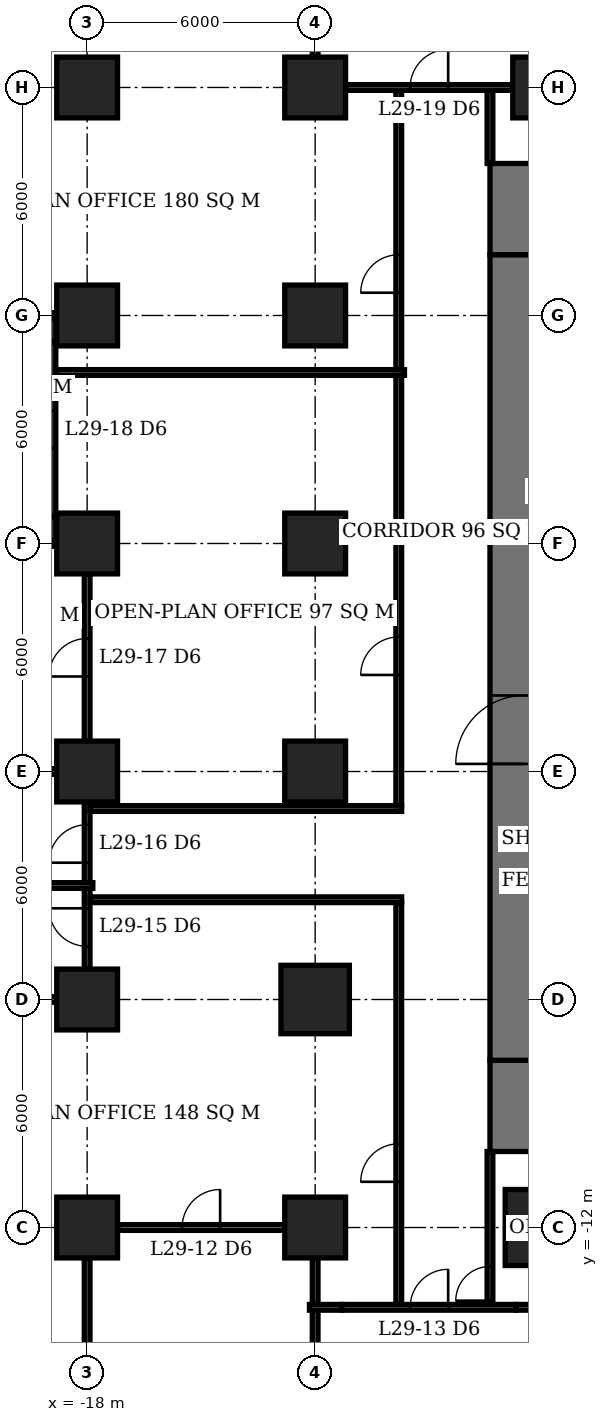
"""IFC4 building model, lengths in metres.
Left out: names, types, materials, properties, quantities, classifications, styles, units other than length and angle.
Written with IfcOpenShell. Run it as: python <this file> out.ifc"""

import sys

from ifc_helpers import new_model, si_unit, direction, frame, frame_2d, origin, origin_2d, place, context, subcontext, project, spatial, rectangle, extrude, element, fill, save


model = new_model("IFC4")
c1 = context("Model", 3, precision=1e-05, world=origin(), true_north=direction((0.0, 1.0)))
c2 = subcontext(c1, "Body", "Model", "MODEL_VIEW")
j1 = project(units=[si_unit("LENGTHUNIT", "METRE"), si_unit("PLANEANGLEUNIT", "RADIAN")], contexts=[c1])
p1 = place(None, origin())
s1 = spatial("IfcSite", under=j1, at=p1, CompositionType="ELEMENT")
p2 = place(p1, origin())
s2 = spatial("IfcBuilding", under=s1, at=p2, CompositionType="ELEMENT")
p3 = place(p2, frame((0.0, 0.0, 121.1)))
s3 = spatial("IfcBuildingStorey", under=s2, at=p3, CompositionType="ELEMENT", Elevation=121.1)
for number, where, z_axis, x_axis in (
    (1, (-18.0, -12.0, 0.0), (0.0, 0.0, 1.0), (1.0, 0.0, 0.0)),
    (2, (-18.0, -6.0, 0.0), (0.0, 0.0, 1.0), (1.0, 0.0, 0.0)),
    (3, (-18.0, 0.0, 0.0), (0.0, 0.0, 1.0), (1.0, 0.0, 0.0)),
    (4, (-18.0, 6.0, 0.0), (0.0, 0.0, 1.0), (1.0, 0.0, 0.0)),
    (5, (-18.0, 12.0, 0.0), (0.0, 0.0, 1.0), (1.0, 0.0, 0.0)),
    (6, (-18.0, 18.0, 0.0), (0.0, 0.0, 1.0), (1.0, 0.0, 0.0)),
    (7, (-12.0, -12.0, 0.0), (0.0, 0.0, 1.0), (1.0, 0.0, 0.0)),
):
    element("IfcColumn", number, at=place(p3, frame(where, z_axis=z_axis, x_axis=x_axis)), inside=s3, PredefinedType="COLUMN", context=c2, shape_type="SweptSolid", body=[
        extrude(rectangle(XDim=1.6, YDim=1.6, at=origin_2d()), origin(), (0.0, 0.0, 1.0), 3.9),
    ])
p4 = place(p3, frame((-12.0, -6.0, 0.0), z_axis=(0.0, 0.0, 1.0), x_axis=(1.0, 0.0, 0.0)))
e8 = element("IfcColumn", 8, at=p4, inside=s3, PredefinedType="COLUMN", context=c2, shape_type="SweptSolid", body=[
    extrude(rectangle(XDim=1.8, YDim=1.8, at=origin_2d()), origin(), (0.0, 0.0, 1.0), 3.9),
])
for number, where, z_axis, x_axis in (
    (9, (-12.0, 0.0, 0.0), (0.0, 0.0, 1.0), (1.0, 0.0, 0.0)),
    (10, (-12.0, 6.0, 0.0), (0.0, 0.0, 1.0), (1.0, 0.0, 0.0)),
    (11, (-12.0, 12.0, 0.0), (0.0, 0.0, 1.0), (1.0, 0.0, 0.0)),
    (12, (-12.0, 18.0, 0.0), (0.0, 0.0, 1.0), (1.0, 0.0, 0.0)),
):
    element("IfcColumn", number, at=place(p3, frame(where, z_axis=z_axis, x_axis=x_axis)), inside=s3, PredefinedType="COLUMN", context=c2, shape_type="SweptSolid", body=[
        extrude(rectangle(XDim=1.6, YDim=1.6, at=origin_2d()), origin(), (0.0, 0.0, 1.0), 3.9),
    ])
p5 = place(p3, frame((-6.0, -12.0, 0.0), z_axis=(0.0, 0.0, 1.0), x_axis=(1.0, 0.0, 0.0)))
e13 = element("IfcColumn", 13, at=p5, inside=s3, PredefinedType="COLUMN", context=c2, shape_type="SweptSolid", body=[
    extrude(rectangle(XDim=2.0, YDim=2.0, at=origin_2d()), origin(), (0.0, 0.0, 1.0), 3.9),
])
p6 = place(p3, frame((-6.0, 18.0, 0.0), z_axis=(0.0, 0.0, 1.0), x_axis=(1.0, 0.0, 0.0)))
e14 = element("IfcColumn", 14, at=p6, inside=s3, PredefinedType="COLUMN", context=c2, shape_type="SweptSolid", body=[
    extrude(rectangle(XDim=1.6, YDim=1.6, at=origin_2d()), origin(), (0.0, 0.0, 1.0), 3.9),
])
p7 = place(p3, frame((-6.5, -7.6, 0.0), z_axis=(0.0, 0.0, 1.0), x_axis=(0.0, 1.0, 0.0)))
e15 = element("IfcWall", 15, at=p7, inside=s3, PredefinedType="SHEAR", context=c2, shape_type="SweptSolid", body=[
    extrude(rectangle(XDim=21.2, YDim=1.8, at=frame_2d((10.6, 0.0))), origin(), (0.0, 0.0, 1.0), 3.9),
])
p8 = place(p7, frame((7.8, 0.0, 0.0)))
e16 = element("IfcOpeningElement", 16, at=p8, cuts=e15, PredefinedType="OPENING", context=c2, shape_type="SweptSolid", body=[
    extrude(rectangle(XDim=1.8, YDim=2.4, at=frame_2d((0.9, 1.2))), frame((0.0, 0.91, 0.0), z_axis=(0.0, -1.0, 0.0), x_axis=(1.0, 0.0, 0.0)), (0.0, 0.0, 1.0), 1.82),
])
for number, where, z_axis, x_axis in (
    (17, (-6.5, -10.0, 0.0), (0.0, 0.0, 1.0), (0.0, 1.0, 0.0)),
    (18, (-6.5, 13.6, 0.0), (0.0, 0.0, 1.0), (0.0, 1.0, 0.0)),
):
    element("IfcWall", number, at=place(p3, frame(where, z_axis=z_axis, x_axis=x_axis)), inside=s3, PredefinedType="SHEAR", context=c2, shape_type="SweptSolid", body=[
        extrude(rectangle(XDim=2.4, YDim=1.8, at=frame_2d((1.2, 0.0))), origin(), (0.0, 0.0, 1.0), 3.9),
    ])
p9 = place(p3, frame((-12.15, -14.1, 0.0), z_axis=(0.0, 0.0, 1.0), x_axis=(1.0, 0.0, 0.0)))
e19 = element("IfcWall", 19, at=p9, inside=s3, PredefinedType="PARTITIONING", context=c2, shape_type="SweptSolid", body=[
    extrude(rectangle(XDim=0.86, YDim=0.15, at=frame_2d((0.43, 0.0))), origin(), (0.0, 0.0, 1.0), 2.65),
])
p10 = place(p3, frame((-11.29, -14.1, 0.0), z_axis=(0.0, 0.0, 1.0), x_axis=(1.0, 0.0, 0.0)))
e20 = element("IfcWall", 20, at=p10, inside=s3, PredefinedType="PARTITIONING", context=c2, shape_type="SweptSolid", body=[
    extrude(rectangle(XDim=4.58, YDim=0.15, at=frame_2d((2.29, 0.0))), origin(), (0.0, 0.0, 1.0), 3.65),
])
p11 = place(p10, frame((1.79, 0.0, 0.0)))
e21 = element("IfcOpeningElement", 21, at=p11, cuts=e20, PredefinedType="OPENING", context=c2, shape_type="SweptSolid", body=[
    extrude(rectangle(XDim=1.0, YDim=2.1, at=frame_2d((0.5, 1.05))), frame((0.0, 0.085, 0.0), z_axis=(0.0, -1.0, 0.0), x_axis=(1.0, 0.0, 0.0)), (0.0, 0.0, 1.0), 0.17),
])
p12 = place(p3, frame((-6.71, -14.1, 0.0), z_axis=(0.0, 0.0, 1.0), x_axis=(1.0, 0.0, 0.0)))
e22 = element("IfcWall", 22, at=p12, inside=s3, PredefinedType="PARTITIONING", context=c2, shape_type="SweptSolid", body=[
    extrude(rectangle(XDim=0.785, YDim=0.15, at=frame_2d((0.393, 0.0))), origin(), (0.0, 0.0, 1.0), 2.65),
])
p13 = place(p3, frame((-17.2, -12.0, 0.0), z_axis=(0.0, 0.0, 1.0), x_axis=(1.0, 0.0, 0.0)))
e23 = element("IfcWall", 23, at=p13, inside=s3, PredefinedType="PARTITIONING", context=c2, shape_type="SweptSolid", body=[
    extrude(rectangle(XDim=4.4, YDim=0.15, at=frame_2d((2.2, 0.0))), origin(), (0.0, 0.0, 1.0), 3.65),
])
p14 = place(p13, frame((1.7, 0.0, 0.0)))
e24 = element("IfcOpeningElement", 24, at=p14, cuts=e23, PredefinedType="OPENING", context=c2, shape_type="SweptSolid", body=[
    extrude(rectangle(XDim=1.0, YDim=2.1, at=frame_2d((0.5, 1.05))), frame((0.0, 0.085, 0.0), z_axis=(0.0, -1.0, 0.0), x_axis=(1.0, 0.0, 0.0)), (0.0, 0.0, 1.0), 0.17),
])
p15 = place(p3, frame((-22.31, -6.0, 0.0), z_axis=(0.0, 0.0, 1.0), x_axis=(1.0, 0.0, 0.0)))
e25 = element("IfcWall", 25, at=p15, inside=s3, PredefinedType="PARTITIONING", context=c2, shape_type="SweptSolid", body=[
    extrude(rectangle(XDim=3.51, YDim=0.15, at=frame_2d((1.755, 0.0))), origin(), (0.0, 0.0, 1.0), 2.65),
])
p16 = place(p3, frame((-21.59, -3.0, 0.0), z_axis=(0.0, 0.0, 1.0), x_axis=(1.0, 0.0, 0.0)))
e26 = element("IfcWall", 26, at=p16, inside=s3, PredefinedType="PARTITIONING", context=c2, shape_type="SweptSolid", body=[
    extrude(rectangle(XDim=3.74, YDim=0.15, at=frame_2d((1.87, 0.0))), origin(), (0.0, 0.0, 1.0), 3.65),
])
p17 = place(p3, frame((-22.31, 0.0, 0.0), z_axis=(0.0, 0.0, 1.0), x_axis=(1.0, 0.0, 0.0)))
e27 = element("IfcWall", 27, at=p17, inside=s3, PredefinedType="PARTITIONING", context=c2, shape_type="SweptSolid", body=[
    extrude(rectangle(XDim=3.51, YDim=0.15, at=frame_2d((1.755, 0.0))), origin(), (0.0, 0.0, 1.0), 2.65),
])
for number, where, z_axis, x_axis in (
    (28, (-22.31, 6.0, 0.0), (0.0, 0.0, 1.0), (1.0, 0.0, 0.0)),
    (29, (-22.31, 12.0, 0.0), (0.0, 0.0, 1.0), (1.0, 0.0, 0.0)),
):
    element("IfcWall", number, at=place(p3, frame(where, z_axis=z_axis, x_axis=x_axis)), inside=s3, PredefinedType="PARTITIONING", context=c2, shape_type="SweptSolid", body=[
        extrude(rectangle(XDim=3.485, YDim=0.15, at=frame_2d((1.743, 0.0))), origin(), (0.0, 0.0, 1.0), 2.65),
    ])
p18 = place(p3, frame((-11.2, 18.0, 0.0), z_axis=(0.0, 0.0, 1.0), x_axis=(1.0, 0.0, 0.0)))
e30 = element("IfcWall", 30, at=p18, inside=s3, PredefinedType="PARTITIONING", context=c2, shape_type="SweptSolid", body=[
    extrude(rectangle(XDim=4.4, YDim=0.15, at=frame_2d((2.2, 0.0))), origin(), (0.0, 0.0, 1.0), 3.65),
])
p19 = place(p18, frame((1.7, 0.0, 0.0)))
e31 = element("IfcOpeningElement", 31, at=p19, cuts=e30, PredefinedType="OPENING", context=c2, shape_type="SweptSolid", body=[
    extrude(rectangle(XDim=1.0, YDim=2.1, at=frame_2d((0.5, 1.05))), frame((0.0, 0.085, 0.0), z_axis=(0.0, -1.0, 0.0), x_axis=(1.0, 0.0, 0.0)), (0.0, 0.0, 1.0), 0.17),
])
p20 = place(p3, frame((-18.9, 6.075, 0.0), z_axis=(0.0, 0.0, 1.0), x_axis=(0.0, 1.0, 0.0)))
e32 = element("IfcWall", 32, at=p20, inside=s3, PredefinedType="PARTITIONING", context=c2, shape_type="SweptSolid", body=[
    extrude(rectangle(XDim=0.635, YDim=0.15, at=frame_2d((0.317, 0.0))), origin(), (0.0, 0.0, 1.0), 2.65),
])
p21 = place(p3, frame((-18.9, 6.71, 0.0), z_axis=(0.0, 0.0, 1.0), x_axis=(0.0, 1.0, 0.0)))
e33 = element("IfcWall", 33, at=p21, inside=s3, PredefinedType="PARTITIONING", context=c2, shape_type="SweptSolid", body=[
    extrude(rectangle(XDim=4.58, YDim=0.15, at=frame_2d((2.29, 0.0))), origin(), (0.0, 0.0, 1.0), 3.65),
])
p22 = place(p21, frame((1.79, 0.0, 0.0)))
e34 = element("IfcOpeningElement", 34, at=p22, cuts=e33, PredefinedType="OPENING", context=c2, shape_type="SweptSolid", body=[
    extrude(rectangle(XDim=1.0, YDim=2.1, at=frame_2d((0.5, 1.05))), frame((0.0, 0.085, 0.0), z_axis=(0.0, -1.0, 0.0), x_axis=(1.0, 0.0, 0.0)), (0.0, 0.0, 1.0), 0.17),
])
p23 = place(p3, frame((-18.9, 11.29, 0.0), z_axis=(0.0, 0.0, 1.0), x_axis=(0.0, 1.0, 0.0)))
e35 = element("IfcWall", 35, at=p23, inside=s3, PredefinedType="PARTITIONING", context=c2, shape_type="SweptSolid", body=[
    extrude(rectangle(XDim=0.635, YDim=0.15, at=frame_2d((0.317, 0.0))), origin(), (0.0, 0.0, 1.0), 2.65),
])
p24 = place(p3, frame((-18.0, -16.31, 0.0), z_axis=(0.0, 0.0, 1.0), x_axis=(0.0, 1.0, 0.0)))
e36 = element("IfcWall", 36, at=p24, inside=s3, PredefinedType="PARTITIONING", context=c2, shape_type="SweptSolid", body=[
    extrude(rectangle(XDim=3.51, YDim=0.15, at=frame_2d((1.755, 0.0))), origin(), (0.0, 0.0, 1.0), 2.65),
])
p25 = place(p3, frame((-18.0, -5.2, 0.0), z_axis=(0.0, 0.0, 1.0), x_axis=(0.0, 1.0, 0.0)))
e37 = element("IfcWall", 37, at=p25, inside=s3, PredefinedType="PARTITIONING", context=c2, shape_type="SweptSolid", body=[
    extrude(rectangle(XDim=2.125, YDim=0.15, at=frame_2d((1.062, 0.0))), origin(), (0.0, 0.0, 1.0), 3.65),
])
p26 = place(p25, frame((0.6, 0.0, 0.0)))
e38 = element("IfcOpeningElement", 38, at=p26, cuts=e37, PredefinedType="OPENING", context=c2, shape_type="SweptSolid", body=[
    extrude(rectangle(XDim=1.0, YDim=2.1, at=frame_2d((0.5, 1.05))), frame((0.0, 0.085, 0.0), z_axis=(0.0, -1.0, 0.0), x_axis=(1.0, 0.0, 0.0)), (0.0, 0.0, 1.0), 0.17),
])
p27 = place(p3, frame((-18.0, -2.925, 0.0), z_axis=(0.0, 0.0, 1.0), x_axis=(0.0, 1.0, 0.0)))
e39 = element("IfcWall", 39, at=p27, inside=s3, PredefinedType="PARTITIONING", context=c2, shape_type="SweptSolid", body=[
    extrude(rectangle(XDim=2.125, YDim=0.15, at=frame_2d((1.062, 0.0))), origin(), (0.0, 0.0, 1.0), 3.65),
])
p28 = place(p27, frame((0.525, 0.0, 0.0)))
e40 = element("IfcOpeningElement", 40, at=p28, cuts=e39, PredefinedType="OPENING", context=c2, shape_type="SweptSolid", body=[
    extrude(rectangle(XDim=1.0, YDim=2.1, at=frame_2d((0.5, 1.05))), frame((0.0, 0.085, 0.0), z_axis=(0.0, -1.0, 0.0), x_axis=(1.0, 0.0, 0.0)), (0.0, 0.0, 1.0), 0.17),
])
p29 = place(p3, frame((-18.0, 0.8, 0.0), z_axis=(0.0, 0.0, 1.0), x_axis=(0.0, 1.0, 0.0)))
e41 = element("IfcWall", 41, at=p29, inside=s3, PredefinedType="PARTITIONING", context=c2, shape_type="SweptSolid", body=[
    extrude(rectangle(XDim=4.4, YDim=0.15, at=frame_2d((2.2, 0.0))), origin(), (0.0, 0.0, 1.0), 3.65),
])
p30 = place(p29, frame((1.7, 0.0, 0.0)))
e42 = element("IfcOpeningElement", 42, at=p30, cuts=e41, PredefinedType="OPENING", context=c2, shape_type="SweptSolid", body=[
    extrude(rectangle(XDim=1.0, YDim=2.1, at=frame_2d((0.5, 1.05))), frame((0.0, 0.085, 0.0), z_axis=(0.0, -1.0, 0.0), x_axis=(1.0, 0.0, 0.0)), (0.0, 0.0, 1.0), 0.17),
])
p31 = place(p3, frame((-12.0, -16.31, 0.0), z_axis=(0.0, 0.0, 1.0), x_axis=(0.0, 1.0, 0.0)))
e43 = element("IfcWall", 43, at=p31, inside=s3, PredefinedType="PARTITIONING", context=c2, shape_type="SweptSolid", body=[
    extrude(rectangle(XDim=2.135, YDim=0.15, at=frame_2d((1.067, 0.0))), origin(), (0.0, 0.0, 1.0), 2.65),
])
p32 = place(p3, frame((-12.0, -14.025, 0.0), z_axis=(0.0, 0.0, 1.0), x_axis=(0.0, 1.0, 0.0)))
e44 = element("IfcWall", 44, at=p32, inside=s3, PredefinedType="PARTITIONING", context=c2, shape_type="SweptSolid", body=[
    extrude(rectangle(XDim=1.225, YDim=0.15, at=frame_2d((0.612, 0.0))), origin(), (0.0, 0.0, 1.0), 2.65),
])
p33 = place(p3, frame((-12.0, 18.8, 0.0), z_axis=(0.0, 0.0, 1.0), x_axis=(0.0, 1.0, 0.0)))
e45 = element("IfcWall", 45, at=p33, inside=s3, PredefinedType="PARTITIONING", context=c2, shape_type="SweptSolid", body=[
    extrude(rectangle(XDim=4.55, YDim=0.15, at=frame_2d((2.275, 0.0))), origin(), (0.0, 0.0, 1.0), 3.65),
])
p34 = place(p3, frame((-18.825, 10.5, 0.0), z_axis=(0.0, 0.0, 1.0), x_axis=(1.0, 0.0, 0.0)))
e46 = element("IfcWall", 46, at=p34, inside=s3, PredefinedType="PARTITIONING", context=c2, shape_type="SweptSolid", body=[
    extrude(rectangle(XDim=9.175, YDim=0.15, at=frame_2d((4.587, 0.0))), origin(), (0.0, 0.0, 1.0), 3.65),
])
for number, where, z_axis, x_axis in (
    (47, (-17.925, -3.375, 0.0), (0.0, 0.0, 1.0), (1.0, 0.0, 0.0)),
    (48, (-17.925, -0.975, 0.0), (0.0, 0.0, 1.0), (1.0, 0.0, 0.0)),
):
    element("IfcWall", number, at=place(p3, frame(where, z_axis=z_axis, x_axis=x_axis)), inside=s3, PredefinedType="PARTITIONING", context=c2, shape_type="SweptSolid", body=[
        extrude(rectangle(XDim=8.2, YDim=0.15, at=frame_2d((4.1, 0.0))), origin(), (0.0, 0.0, 1.0), 3.65),
    ])
p35 = place(p3, frame((-9.8, -14.025, 0.0), z_axis=(0.0, 0.0, 1.0), x_axis=(0.0, 1.0, 0.0)))
e49 = element("IfcWall", 49, at=p35, inside=s3, PredefinedType="PARTITIONING", context=c2, shape_type="SweptSolid", body=[
    extrude(rectangle(XDim=10.575, YDim=0.15, at=frame_2d((5.288, 0.0))), origin(), (0.0, 0.0, 1.0), 3.65),
])
p36 = place(p35, frame((3.228, 0.0, 0.0)))
e50 = element("IfcOpeningElement", 50, at=p36, cuts=e49, PredefinedType="OPENING", context=c2, shape_type="SweptSolid", body=[
    extrude(rectangle(XDim=1.0, YDim=2.1, at=frame_2d((0.5, 1.05))), frame((0.0, 0.085, 0.0), z_axis=(0.0, -1.0, 0.0), x_axis=(1.0, 0.0, 0.0)), (0.0, 0.0, 1.0), 0.17),
])
p37 = place(p3, frame((-9.8, -0.9, 0.0), z_axis=(0.0, 0.0, 1.0), x_axis=(0.0, 1.0, 0.0)))
e51 = element("IfcWall", 51, at=p37, inside=s3, PredefinedType="PARTITIONING", context=c2, shape_type="SweptSolid", body=[
    extrude(rectangle(XDim=11.325, YDim=0.15, at=frame_2d((5.663, 0.0))), origin(), (0.0, 0.0, 1.0), 3.65),
])
p38 = place(p37, frame((3.441, 0.0, 0.0)))
e52 = element("IfcOpeningElement", 52, at=p38, cuts=e51, PredefinedType="OPENING", context=c2, shape_type="SweptSolid", body=[
    extrude(rectangle(XDim=1.0, YDim=2.1, at=frame_2d((0.5, 1.05))), frame((0.0, 0.085, 0.0), z_axis=(0.0, -1.0, 0.0), x_axis=(1.0, 0.0, 0.0)), (0.0, 0.0, 1.0), 0.17),
])
p39 = place(p3, frame((-9.8, 10.575, 0.0), z_axis=(0.0, 0.0, 1.0), x_axis=(0.0, 1.0, 0.0)))
e53 = element("IfcWall", 53, at=p39, inside=s3, PredefinedType="PARTITIONING", context=c2, shape_type="SweptSolid", body=[
    extrude(rectangle(XDim=7.35, YDim=0.15, at=frame_2d((3.675, 0.0))), origin(), (0.0, 0.0, 1.0), 3.65),
])
p40 = place(p39, frame((2.024, 0.0, 0.0)))
e54 = element("IfcOpeningElement", 54, at=p40, cuts=e53, PredefinedType="OPENING", context=c2, shape_type="SweptSolid", body=[
    extrude(rectangle(XDim=1.0, YDim=2.1, at=frame_2d((0.5, 1.05))), frame((0.0, 0.085, 0.0), z_axis=(0.0, -1.0, 0.0), x_axis=(1.0, 0.0, 0.0)), (0.0, 0.0, 1.0), 0.17),
])
p41 = place(p3, frame((-7.4, -14.025, 0.0), z_axis=(0.0, 0.0, 1.0), x_axis=(0.0, 1.0, 0.0)))
e55 = element("IfcWall", 55, at=p41, inside=s3, PredefinedType="PARTITIONING", context=c2, shape_type="SweptSolid", body=[
    extrude(rectangle(XDim=4.025, YDim=0.15, at=frame_2d((2.012, 0.0))), origin(), (0.0, 0.0, 1.0), 3.65),
])
p42 = place(p41, frame((0.1, 0.0, 0.0)))
e56 = element("IfcOpeningElement", 56, at=p42, cuts=e55, PredefinedType="OPENING", context=c2, shape_type="SweptSolid", body=[
    extrude(rectangle(XDim=0.9, YDim=2.1, at=frame_2d((0.45, 1.05))), frame((0.0, 0.085, 0.0), z_axis=(0.0, -1.0, 0.0), x_axis=(1.0, 0.0, 0.0)), (0.0, 0.0, 1.0), 0.17),
])
p43 = place(p3, frame((-7.4, 16.0, 0.0), z_axis=(0.0, 0.0, 1.0), x_axis=(0.0, 1.0, 0.0)))
e57 = element("IfcWall", 57, at=p43, inside=s3, PredefinedType="PARTITIONING", context=c2, shape_type="SweptSolid", body=[
    extrude(rectangle(XDim=1.925, YDim=0.15, at=frame_2d((0.962, 0.0))), origin(), (0.0, 0.0, 1.0), 3.65),
])
p44 = place(p8, origin())
e58 = element("IfcDoor", 58, at=p44, inside=s3, OperationType="DOUBLE_DOOR_SINGLE_SWING", PredefinedType="DOOR", context=c2, shape_type="SweptSolid", body=[
    extrude(rectangle(XDim=1.8, YDim=2.4, at=frame_2d((0.9, 1.2))), frame((0.0, 0.025, 0.0), z_axis=(0.0, -1.0, 0.0), x_axis=(1.0, 0.0, 0.0)), (0.0, 0.0, 1.0), 0.05),
])
fill(e16, e58)
p45 = place(p14, origin())
e59 = element("IfcDoor", 59, at=p45, inside=s3, OperationType="SINGLE_SWING_RIGHT", PredefinedType="DOOR", context=c2, shape_type="SweptSolid", body=[
    extrude(rectangle(XDim=1.0, YDim=2.1, at=frame_2d((0.5, 1.05))), frame((0.0, 0.025, 0.0), z_axis=(0.0, -1.0, 0.0), x_axis=(1.0, 0.0, 0.0)), (0.0, 0.0, 1.0), 0.05),
])
fill(e24, e59)
p46 = place(p11, origin())
e60 = element("IfcDoor", 60, at=p46, inside=s3, OperationType="SINGLE_SWING_RIGHT", PredefinedType="DOOR", context=c2, shape_type="SweptSolid", body=[
    extrude(rectangle(XDim=1.0, YDim=2.1, at=frame_2d((0.5, 1.05))), frame((0.0, 0.025, 0.0), z_axis=(0.0, -1.0, 0.0), x_axis=(1.0, 0.0, 0.0)), (0.0, 0.0, 1.0), 0.05),
])
fill(e21, e60)
p47 = place(p26, origin())
e61 = element("IfcDoor", 61, at=p47, inside=s3, OperationType="SINGLE_SWING_RIGHT", PredefinedType="DOOR", context=c2, shape_type="SweptSolid", body=[
    extrude(rectangle(XDim=1.0, YDim=2.1, at=frame_2d((0.5, 1.05))), frame((0.0, 0.025, 0.0), z_axis=(0.0, -1.0, 0.0), x_axis=(1.0, 0.0, 0.0)), (0.0, 0.0, 1.0), 0.05),
])
fill(e38, e61)
p48 = place(p28, origin())
e62 = element("IfcDoor", 62, at=p48, inside=s3, OperationType="SINGLE_SWING_LEFT", PredefinedType="DOOR", context=c2, shape_type="SweptSolid", body=[
    extrude(rectangle(XDim=1.0, YDim=2.1, at=frame_2d((0.5, 1.05))), frame((0.0, 0.025, 0.0), z_axis=(0.0, -1.0, 0.0), x_axis=(1.0, 0.0, 0.0)), (0.0, 0.0, 1.0), 0.05),
])
fill(e40, e62)
p49 = place(p30, origin())
e63 = element("IfcDoor", 63, at=p49, inside=s3, OperationType="SINGLE_SWING_LEFT", PredefinedType="DOOR", context=c2, shape_type="SweptSolid", body=[
    extrude(rectangle(XDim=1.0, YDim=2.1, at=frame_2d((0.5, 1.05))), frame((0.0, 0.025, 0.0), z_axis=(0.0, -1.0, 0.0), x_axis=(1.0, 0.0, 0.0)), (0.0, 0.0, 1.0), 0.05),
])
fill(e42, e63)
p50 = place(p22, origin())
e64 = element("IfcDoor", 64, at=p50, inside=s3, OperationType="SINGLE_SWING_LEFT", PredefinedType="DOOR", context=c2, shape_type="SweptSolid", body=[
    extrude(rectangle(XDim=1.0, YDim=2.1, at=frame_2d((0.5, 1.05))), frame((0.0, 0.025, 0.0), z_axis=(0.0, -1.0, 0.0), x_axis=(1.0, 0.0, 0.0)), (0.0, 0.0, 1.0), 0.05),
])
fill(e34, e64)
p51 = place(p19, origin())
e65 = element("IfcDoor", 65, at=p51, inside=s3, OperationType="SINGLE_SWING_RIGHT", PredefinedType="DOOR", context=c2, shape_type="SweptSolid", body=[
    extrude(rectangle(XDim=1.0, YDim=2.1, at=frame_2d((0.5, 1.05))), frame((0.0, 0.025, 0.0), z_axis=(0.0, -1.0, 0.0), x_axis=(1.0, 0.0, 0.0)), (0.0, 0.0, 1.0), 0.05),
])
fill(e31, e65)
p52 = place(p36, origin())
e66 = element("IfcDoor", 66, at=p52, inside=s3, OperationType="SINGLE_SWING_LEFT", PredefinedType="DOOR", context=c2, shape_type="SweptSolid", body=[
    extrude(rectangle(XDim=1.0, YDim=2.1, at=frame_2d((0.5, 1.05))), frame((0.0, 0.025, 0.0), z_axis=(0.0, -1.0, 0.0), x_axis=(1.0, 0.0, 0.0)), (0.0, 0.0, 1.0), 0.05),
])
fill(e50, e66)
p53 = place(p38, origin())
e67 = element("IfcDoor", 67, at=p53, inside=s3, OperationType="SINGLE_SWING_LEFT", PredefinedType="DOOR", context=c2, shape_type="SweptSolid", body=[
    extrude(rectangle(XDim=1.0, YDim=2.1, at=frame_2d((0.5, 1.05))), frame((0.0, 0.025, 0.0), z_axis=(0.0, -1.0, 0.0), x_axis=(1.0, 0.0, 0.0)), (0.0, 0.0, 1.0), 0.05),
])
fill(e52, e67)
p54 = place(p40, origin())
e68 = element("IfcDoor", 68, at=p54, inside=s3, OperationType="SINGLE_SWING_LEFT", PredefinedType="DOOR", context=c2, shape_type="SweptSolid", body=[
    extrude(rectangle(XDim=1.0, YDim=2.1, at=frame_2d((0.5, 1.05))), frame((0.0, 0.025, 0.0), z_axis=(0.0, -1.0, 0.0), x_axis=(1.0, 0.0, 0.0)), (0.0, 0.0, 1.0), 0.05),
])
fill(e54, e68)
p55 = place(p42, origin())
e69 = element("IfcDoor", 69, at=p55, inside=s3, OperationType="SINGLE_SWING_LEFT", PredefinedType="DOOR", context=c2, shape_type="SweptSolid", body=[
    extrude(rectangle(XDim=0.9, YDim=2.1, at=frame_2d((0.45, 1.05))), frame((0.0, 0.025, 0.0), z_axis=(0.0, -1.0, 0.0), x_axis=(1.0, 0.0, 0.0)), (0.0, 0.0, 1.0), 0.05),
])
fill(e56, e69)
save(model, sys.argv[1])
